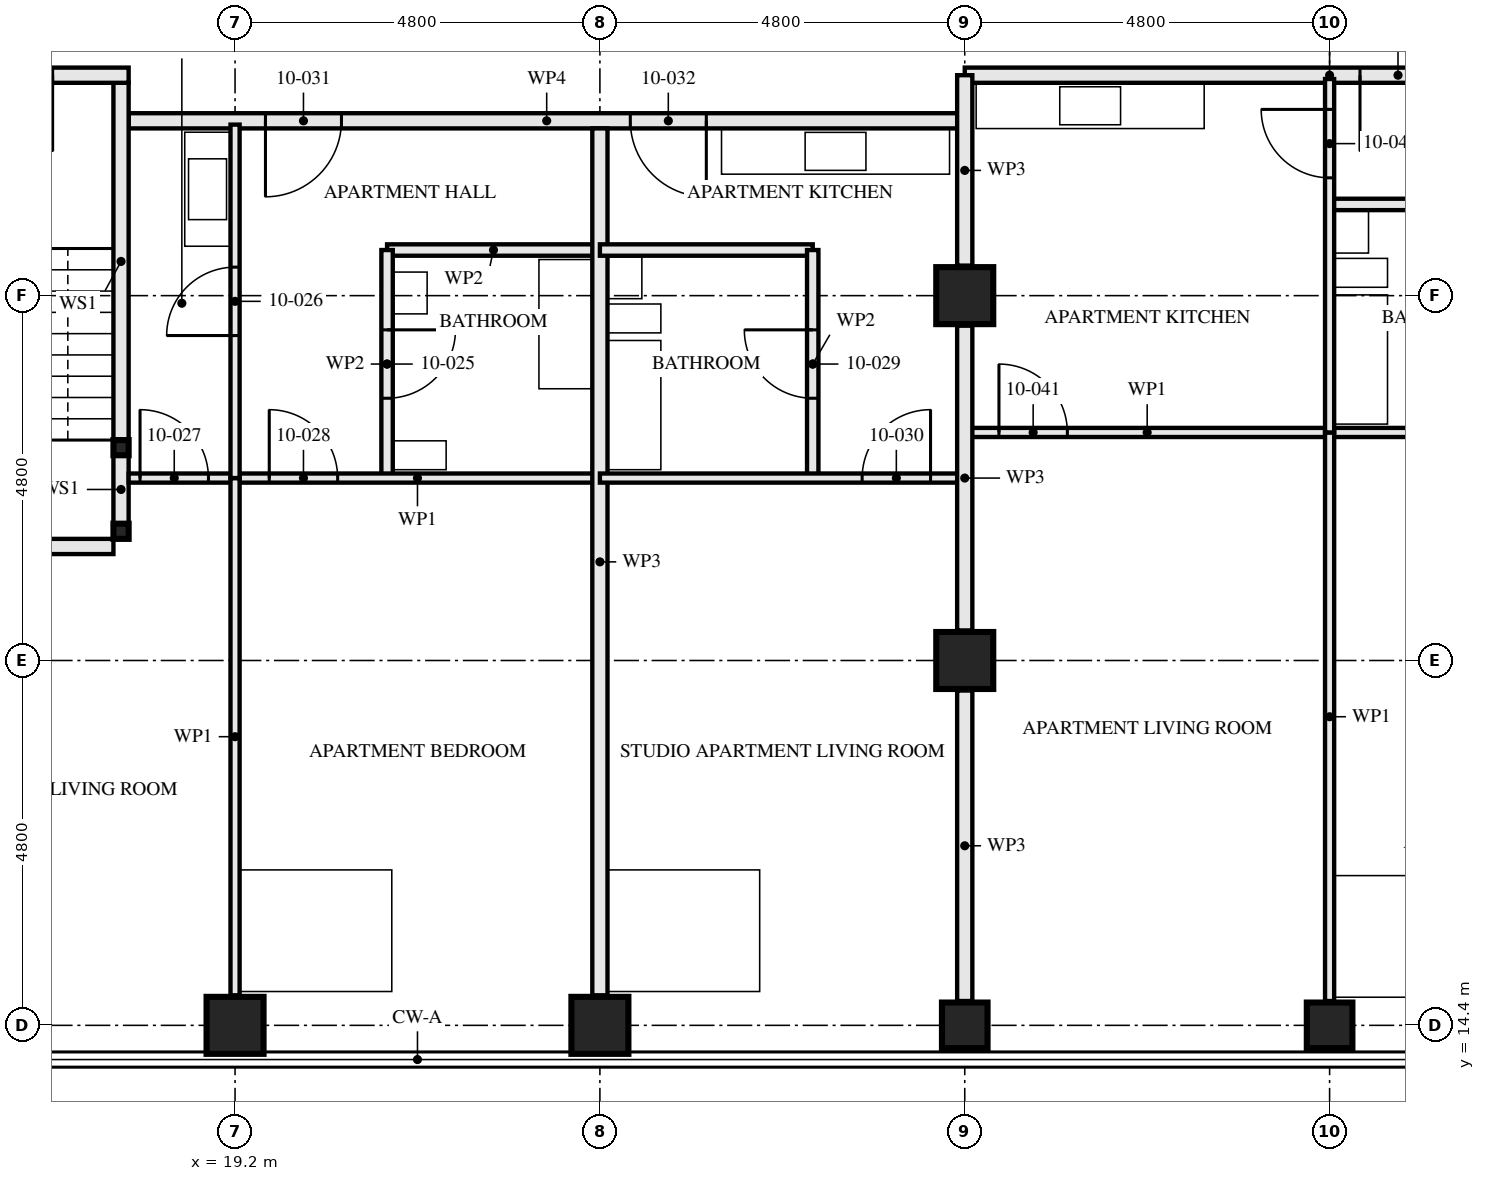
"""IFC4 building model, lengths in metres.
Left out: names, types, materials, properties, quantities, classifications, styles, units other than length and angle.
Written with IfcOpenShell. Run it as: python <this file> out.ifc"""

import sys

from ifc_helpers import new_model, si_unit, direction, frame, frame_2d, origin, origin_2d, place, context, subcontext, project, spatial, rectangle, hollow_rectangle, extrude, element, fill, save


model = new_model("IFC4")
c1 = context("Model", 3, precision=1e-05, world=origin(), true_north=direction((0.0, 1.0)))
c2 = subcontext(c1, "Body", "Model", "MODEL_VIEW")
j1 = project(units=[si_unit("LENGTHUNIT", "METRE"), si_unit("PLANEANGLEUNIT", "RADIAN")], contexts=[c1])
p1 = place(None, origin())
s1 = spatial("IfcSite", under=j1, at=p1, CompositionType="ELEMENT")
p2 = place(p1, origin())
s2 = spatial("IfcBuilding", under=s1, at=p2, CompositionType="ELEMENT")
p3 = place(p2, frame((0.0, 0.0, 41.0)))
s3 = spatial("IfcBuildingStorey", under=s2, at=p3, CompositionType="ELEMENT", Elevation=41.0)
for number, where, z_axis, x_axis in (
    (1, (19.2, 14.4, 0.0), (0.0, 0.0, 1.0), (0.0, 1.0, 0.0)),
    (2, (24.0, 14.4, 0.0), (0.0, 0.0, 1.0), (0.0, 1.0, 0.0)),
):
    element("IfcColumn", number, at=place(p3, frame(where, z_axis=z_axis, x_axis=x_axis)), inside=s3, PredefinedType="COLUMN", context=c2, shape_type="SweptSolid", body=[
        extrude(hollow_rectangle(XDim=0.75, YDim=0.75, WallThickness=0.08, at=origin_2d()), origin(), (0.0, 0.0, 1.0), 3.5),
    ])
p4 = place(p3, frame((28.8, 14.4, 0.0), z_axis=(0.0, 0.0, 1.0), x_axis=(0.0, 1.0, 0.0)))
e3 = element("IfcColumn", 3, at=p4, inside=s3, PredefinedType="COLUMN", context=c2, shape_type="SweptSolid", body=[
    extrude(hollow_rectangle(XDim=0.6, YDim=0.6, WallThickness=0.08, at=origin_2d()), origin(), (0.0, 0.0, 1.0), 3.5),
])
for number, where, z_axis, x_axis in (
    (4, (28.8, 19.2, 0.0), (0.0, 0.0, 1.0), (1.0, 0.0, 0.0)),
    (5, (28.8, 24.0, 0.0), (0.0, 0.0, 1.0), (1.0, 0.0, 0.0)),
):
    element("IfcColumn", number, at=place(p3, frame(where, z_axis=z_axis, x_axis=x_axis)), inside=s3, PredefinedType="COLUMN", context=c2, shape_type="SweptSolid", body=[
        extrude(hollow_rectangle(XDim=0.75, YDim=0.75, WallThickness=0.08, at=origin_2d()), origin(), (0.0, 0.0, 1.0), 3.5),
    ])
p5 = place(p3, frame((33.6, 14.4, 0.0), z_axis=(0.0, 0.0, 1.0), x_axis=(0.0, 1.0, 0.0)))
e6 = element("IfcColumn", 6, at=p5, inside=s3, PredefinedType="COLUMN", context=c2, shape_type="SweptSolid", body=[
    extrude(hollow_rectangle(XDim=0.6, YDim=0.6, WallThickness=0.08, at=origin_2d()), origin(), (0.0, 0.0, 1.0), 3.5),
])
for number, where, z_axis, x_axis in (
    (7, (17.7, 20.9, 0.0), (0.0, 0.0, 1.0), (1.0, 0.0, 0.0)),
    (8, (17.7, 22.0, 0.0), (0.0, 0.0, 1.0), (1.0, 0.0, 0.0)),
):
    element("IfcColumn", number, at=place(p3, frame(where, z_axis=z_axis, x_axis=x_axis)), inside=s3, PredefinedType="COLUMN", context=c2, shape_type="SweptSolid", body=[
        extrude(hollow_rectangle(XDim=0.2, YDim=0.2, WallThickness=0.008, at=origin_2d()), origin(), (0.0, 0.0, 1.0), 3.33),
    ])
p6 = place(p3, frame((17.7, 21.0, 0.0), z_axis=(0.0, 0.0, 1.0), x_axis=(0.0, 1.0, 0.0)))
e9 = element("IfcWall", 9, at=p6, inside=s3, PredefinedType="SOLIDWALL", context=c2, shape_type="SweptSolid", body=[
    extrude(rectangle(XDim=0.9, YDim=0.2, at=frame_2d((0.45, 0.0))), origin(), (0.0, 0.0, 1.0), 2.99),
])
p7 = place(p3, frame((17.7, 22.1, 0.0), z_axis=(0.0, 0.0, 1.0), x_axis=(0.0, 1.0, 0.0)))
e10 = element("IfcWall", 10, at=p7, inside=s3, PredefinedType="SOLIDWALL", context=c2, shape_type="SweptSolid", body=[
    extrude(rectangle(XDim=4.7, YDim=0.2, at=frame_2d((2.35, 0.0))), origin(), (0.0, 0.0, 1.0), 2.99),
])
p8 = place(p3, frame((15.0, 20.7, 0.0), z_axis=(0.0, 0.0, 1.0), x_axis=(1.0, 0.0, 0.0)))
e11 = element("IfcWall", 11, at=p8, inside=s3, PredefinedType="SOLIDWALL", context=c2, shape_type="SweptSolid", body=[
    extrude(rectangle(XDim=2.6, YDim=0.2, at=frame_2d((1.3, 0.0))), origin(), (0.0, 0.0, 1.0), 3.33),
])
p9 = place(p3, frame((14.4, 26.9, 0.0), z_axis=(0.0, 0.0, 1.0), x_axis=(1.0, 0.0, 0.0)))
e12 = element("IfcWall", 12, at=p9, inside=s3, PredefinedType="SOLIDWALL", context=c2, shape_type="SweptSolid", body=[
    extrude(rectangle(XDim=3.4, YDim=0.2, at=frame_2d((1.7, 0.0))), origin(), (0.0, 0.0, 1.0), 3.33),
])
p10 = place(p9, frame((1.4, 0.0, 0.0)))
e13 = element("IfcOpeningElement", 13, at=p10, cuts=e12, PredefinedType="OPENING", context=c2, shape_type="SweptSolid", body=[
    extrude(rectangle(XDim=1.0, YDim=2.1, at=frame_2d((0.5, 1.05))), frame((0.0, 0.111, 0.0), z_axis=(0.0, -1.0, 0.0), x_axis=(1.0, 0.0, 0.0)), (0.0, 0.0, 1.0), 0.221),
])
p11 = place(p3, frame((21.2, 21.6, 0.0), z_axis=(0.0, 0.0, 1.0), x_axis=(0.0, 1.0, 0.0)))
e14 = element("IfcWall", 14, at=p11, inside=s3, PredefinedType="PARTITIONING", context=c2, shape_type="SweptSolid", body=[
    extrude(rectangle(XDim=3.0, YDim=0.15, at=frame_2d((1.5, 0.0))), origin(), (0.0, 0.0, 1.0), 2.55),
])
p12 = place(p11, frame((1.05, 0.0, 0.0)))
e15 = element("IfcOpeningElement", 15, at=p12, cuts=e14, PredefinedType="OPENING", context=c2, shape_type="SweptSolid", body=[
    extrude(rectangle(XDim=0.9, YDim=2.1, at=frame_2d((0.45, 1.05))), frame((0.0, 0.085, 0.0), z_axis=(0.0, -1.0, 0.0), x_axis=(1.0, 0.0, 0.0)), (0.0, 0.0, 1.0), 0.171),
])
p13 = place(p3, frame((21.2, 24.6, 0.0), z_axis=(0.0, 0.0, 1.0), x_axis=(1.0, 0.0, 0.0)))
e16 = element("IfcWall", 16, at=p13, inside=s3, PredefinedType="PARTITIONING", context=c2, shape_type="SweptSolid", body=[
    extrude(rectangle(XDim=2.8, YDim=0.15, at=frame_2d((1.4, 0.0))), origin(), (0.0, 0.0, 1.0), 3.33),
])
p14 = place(p3, frame((19.2, 21.6, 0.0), z_axis=(0.0, 0.0, 1.0), x_axis=(0.0, 1.0, 0.0)))
e17 = element("IfcWall", 17, at=p14, inside=s3, PredefinedType="PARTITIONING", context=c2, shape_type="SweptSolid", body=[
    extrude(rectangle(XDim=4.65, YDim=0.12, at=frame_2d((2.325, 0.0))), origin(), (0.0, 0.0, 1.0), 2.55),
])
p15 = place(p14, frame((1.875, 0.0, 0.0)))
e18 = element("IfcOpeningElement", 18, at=p15, cuts=e17, PredefinedType="OPENING", context=c2, shape_type="SweptSolid", body=[
    extrude(rectangle(XDim=0.9, YDim=2.1, at=frame_2d((0.45, 1.05))), frame((0.0, 0.071, 0.0), z_axis=(0.0, -1.0, 0.0), x_axis=(1.0, 0.0, 0.0)), (0.0, 0.0, 1.0), 0.141),
])
p16 = place(p3, frame((17.8, 21.6, 0.0), z_axis=(0.0, 0.0, 1.0), x_axis=(1.0, 0.0, 0.0)))
e19 = element("IfcWall", 19, at=p16, inside=s3, PredefinedType="PARTITIONING", context=c2, shape_type="SweptSolid", body=[
    extrude(rectangle(XDim=1.4, YDim=0.12, at=frame_2d((0.7, 0.0))), origin(), (0.0, 0.0, 1.0), 3.33),
])
p17 = place(p16, frame((0.15, 0.0, 0.0)))
e20 = element("IfcOpeningElement", 20, at=p17, cuts=e19, PredefinedType="OPENING", context=c2, shape_type="SweptSolid", body=[
    extrude(rectangle(XDim=0.9, YDim=2.1, at=frame_2d((0.45, 1.05))), frame((0.0, 0.071, 0.0), z_axis=(0.0, -1.0, 0.0), x_axis=(1.0, 0.0, 0.0)), (0.0, 0.0, 1.0), 0.141),
])
p18 = place(p3, frame((19.2, 21.6, 0.0), z_axis=(0.0, 0.0, 1.0), x_axis=(1.0, 0.0, 0.0)))
e21 = element("IfcWall", 21, at=p18, inside=s3, PredefinedType="PARTITIONING", context=c2, shape_type="SweptSolid", body=[
    extrude(rectangle(XDim=4.8, YDim=0.12, at=frame_2d((2.4, 0.0))), origin(), (0.0, 0.0, 1.0), 3.33),
])
p19 = place(p18, frame((0.45, 0.0, 0.0)))
e22 = element("IfcOpeningElement", 22, at=p19, cuts=e21, PredefinedType="OPENING", context=c2, shape_type="SweptSolid", body=[
    extrude(rectangle(XDim=0.9, YDim=2.1, at=frame_2d((0.45, 1.05))), frame((0.0, 0.071, 0.0), z_axis=(0.0, -1.0, 0.0), x_axis=(1.0, 0.0, 0.0)), (0.0, 0.0, 1.0), 0.141),
])
p20 = place(p3, frame((19.2, 14.795, 0.0), z_axis=(0.0, 0.0, 1.0), x_axis=(0.0, 1.0, 0.0)))
e23 = element("IfcWall", 23, at=p20, inside=s3, PredefinedType="PARTITIONING", context=c2, shape_type="SweptSolid", body=[
    extrude(rectangle(XDim=6.805, YDim=0.12, at=frame_2d((3.403, 0.0))), origin(), (0.0, 0.0, 1.0), 2.55),
])
p21 = place(p3, frame((24.0, 14.795, 0.0), z_axis=(0.0, 0.0, 1.0), x_axis=(0.0, 1.0, 0.0)))
e24 = element("IfcWall", 24, at=p21, inside=s3, PredefinedType="PARTITIONING", context=c2, shape_type="SweptSolid", body=[
    extrude(rectangle(XDim=11.405, YDim=0.2, at=frame_2d((5.703, 0.0))), origin(), (0.0, 0.0, 1.0), 2.55),
])
p22 = place(p3, frame((26.8, 21.6, 0.0), z_axis=(0.0, 0.0, 1.0), x_axis=(0.0, 1.0, 0.0)))
e25 = element("IfcWall", 25, at=p22, inside=s3, PredefinedType="PARTITIONING", context=c2, shape_type="SweptSolid", body=[
    extrude(rectangle(XDim=3.0, YDim=0.15, at=frame_2d((1.5, 0.0))), origin(), (0.0, 0.0, 1.0), 2.55),
])
p23 = place(p22, frame((1.05, 0.0, 0.0)))
e26 = element("IfcOpeningElement", 26, at=p23, cuts=e25, PredefinedType="OPENING", context=c2, shape_type="SweptSolid", body=[
    extrude(rectangle(XDim=0.9, YDim=2.1, at=frame_2d((0.45, 1.05))), frame((0.0, 0.085, 0.0), z_axis=(0.0, -1.0, 0.0), x_axis=(1.0, 0.0, 0.0)), (0.0, 0.0, 1.0), 0.171),
])
p24 = place(p3, frame((24.0, 24.6, 0.0), z_axis=(0.0, 0.0, 1.0), x_axis=(1.0, 0.0, 0.0)))
e27 = element("IfcWall", 27, at=p24, inside=s3, PredefinedType="PARTITIONING", context=c2, shape_type="SweptSolid", body=[
    extrude(rectangle(XDim=2.8, YDim=0.15, at=frame_2d((1.4, 0.0))), origin(), (0.0, 0.0, 1.0), 3.33),
])
p25 = place(p3, frame((24.0, 21.6, 0.0), z_axis=(0.0, 0.0, 1.0), x_axis=(1.0, 0.0, 0.0)))
e28 = element("IfcWall", 28, at=p25, inside=s3, PredefinedType="PARTITIONING", context=c2, shape_type="SweptSolid", body=[
    extrude(rectangle(XDim=4.8, YDim=0.12, at=frame_2d((2.4, 0.0))), origin(), (0.0, 0.0, 1.0), 3.33),
])
p26 = place(p25, frame((3.45, 0.0, 0.0)))
e29 = element("IfcOpeningElement", 29, at=p26, cuts=e28, PredefinedType="OPENING", context=c2, shape_type="SweptSolid", body=[
    extrude(rectangle(XDim=0.9, YDim=2.1, at=frame_2d((0.45, 1.05))), frame((0.0, 0.071, 0.0), z_axis=(0.0, -1.0, 0.0), x_axis=(1.0, 0.0, 0.0)), (0.0, 0.0, 1.0), 0.141),
])
p27 = place(p3, frame((17.8, 26.3, 0.0), z_axis=(0.0, 0.0, 1.0), x_axis=(1.0, 0.0, 0.0)))
e30 = element("IfcWall", 30, at=p27, inside=s3, PredefinedType="PARTITIONING", context=c2, shape_type="SweptSolid", body=[
    extrude(rectangle(XDim=11.0, YDim=0.2, at=frame_2d((5.5, 0.0))), origin(), (0.0, 0.0, 1.0), 2.55),
])
p28 = place(p27, frame((1.8, 0.0, 0.0)))
e31 = element("IfcOpeningElement", 31, at=p28, cuts=e30, PredefinedType="OPENING", context=c2, shape_type="SweptSolid", body=[
    extrude(rectangle(XDim=1.0, YDim=2.1, at=frame_2d((0.5, 1.05))), frame((0.0, 0.111, 0.0), z_axis=(0.0, -1.0, 0.0), x_axis=(1.0, 0.0, 0.0)), (0.0, 0.0, 1.0), 0.221),
])
p29 = place(p27, frame((6.6, 0.0, 0.0)))
e32 = element("IfcOpeningElement", 32, at=p29, cuts=e30, PredefinedType="OPENING", context=c2, shape_type="SweptSolid", body=[
    extrude(rectangle(XDim=1.0, YDim=2.1, at=frame_2d((0.5, 1.05))), frame((0.0, 0.111, 0.0), z_axis=(0.0, -1.0, 0.0), x_axis=(1.0, 0.0, 0.0)), (0.0, 0.0, 1.0), 0.221),
])
p30 = place(p3, frame((33.6, 25.2, 0.0), z_axis=(0.0, 0.0, 1.0), x_axis=(1.0, 0.0, 0.0)))
e33 = element("IfcWall", 33, at=p30, inside=s3, PredefinedType="PARTITIONING", context=c2, shape_type="SweptSolid", body=[
    extrude(rectangle(XDim=2.8, YDim=0.15, at=frame_2d((1.4, 0.0))), origin(), (0.0, 0.0, 1.0), 3.33),
])
p31 = place(p3, frame((33.6, 22.2, 0.0), z_axis=(0.0, 0.0, 1.0), x_axis=(0.0, 1.0, 0.0)))
e34 = element("IfcWall", 34, at=p31, inside=s3, PredefinedType="PARTITIONING", context=c2, shape_type="SweptSolid", body=[
    extrude(rectangle(XDim=4.65, YDim=0.12, at=frame_2d((2.325, 0.0))), origin(), (0.0, 0.0, 1.0), 2.55),
])
p32 = place(p31, frame((3.35, 0.0, 0.0)))
e35 = element("IfcOpeningElement", 35, at=p32, cuts=e34, PredefinedType="OPENING", context=c2, shape_type="SweptSolid", body=[
    extrude(rectangle(XDim=0.9, YDim=2.1, at=frame_2d((0.45, 1.05))), frame((0.0, 0.071, 0.0), z_axis=(0.0, -1.0, 0.0), x_axis=(1.0, 0.0, 0.0)), (0.0, 0.0, 1.0), 0.141),
])
p33 = place(p3, frame((28.8, 22.2, 0.0), z_axis=(0.0, 0.0, 1.0), x_axis=(1.0, 0.0, 0.0)))
e36 = element("IfcWall", 36, at=p33, inside=s3, PredefinedType="PARTITIONING", context=c2, shape_type="SweptSolid", body=[
    extrude(rectangle(XDim=4.8, YDim=0.12, at=frame_2d((2.4, 0.0))), origin(), (0.0, 0.0, 1.0), 3.33),
])
p34 = place(p33, frame((0.45, 0.0, 0.0)))
e37 = element("IfcOpeningElement", 37, at=p34, cuts=e36, PredefinedType="OPENING", context=c2, shape_type="SweptSolid", body=[
    extrude(rectangle(XDim=0.9, YDim=2.1, at=frame_2d((0.45, 1.05))), frame((0.0, 0.071, 0.0), z_axis=(0.0, -1.0, 0.0), x_axis=(1.0, 0.0, 0.0)), (0.0, 0.0, 1.0), 0.141),
])
p35 = place(p3, frame((33.6, 22.2, 0.0), z_axis=(0.0, 0.0, 1.0), x_axis=(1.0, 0.0, 0.0)))
e38 = element("IfcWall", 38, at=p35, inside=s3, PredefinedType="PARTITIONING", context=c2, shape_type="SweptSolid", body=[
    extrude(rectangle(XDim=4.8, YDim=0.12, at=frame_2d((2.4, 0.0))), origin(), (0.0, 0.0, 1.0), 3.33),
])
p36 = place(p35, frame((3.45, 0.0, 0.0)))
e39 = element("IfcOpeningElement", 39, at=p36, cuts=e38, PredefinedType="OPENING", context=c2, shape_type="SweptSolid", body=[
    extrude(rectangle(XDim=0.9, YDim=2.1, at=frame_2d((0.45, 1.05))), frame((0.0, 0.071, 0.0), z_axis=(0.0, -1.0, 0.0), x_axis=(1.0, 0.0, 0.0)), (0.0, 0.0, 1.0), 0.141),
])
p37 = place(p3, frame((33.6, 14.72, 0.0), z_axis=(0.0, 0.0, 1.0), x_axis=(0.0, 1.0, 0.0)))
e40 = element("IfcWall", 40, at=p37, inside=s3, PredefinedType="PARTITIONING", context=c2, shape_type="SweptSolid", body=[
    extrude(rectangle(XDim=7.48, YDim=0.12, at=frame_2d((3.74, 0.0))), origin(), (0.0, 0.0, 1.0), 2.55),
])
p38 = place(p3, frame((28.8, 26.9, 0.0), z_axis=(0.0, 0.0, 1.0), x_axis=(1.0, 0.0, 0.0)))
e41 = element("IfcWall", 41, at=p38, inside=s3, PredefinedType="PARTITIONING", context=c2, shape_type="SweptSolid", body=[
    extrude(rectangle(XDim=9.6, YDim=0.2, at=frame_2d((4.8, 0.0))), origin(), (0.0, 0.0, 1.0), 3.33),
])
p39 = place(p38, frame((5.2, 0.0, 0.0)))
e42 = element("IfcOpeningElement", 42, at=p39, cuts=e41, PredefinedType="OPENING", context=c2, shape_type="SweptSolid", body=[
    extrude(rectangle(XDim=1.0, YDim=2.1, at=frame_2d((0.5, 1.05))), frame((0.0, 0.111, 0.0), z_axis=(0.0, -1.0, 0.0), x_axis=(1.0, 0.0, 0.0)), (0.0, 0.0, 1.0), 0.221),
])
p40 = place(p3, frame((28.8, 14.72, 0.0), z_axis=(0.0, 0.0, 1.0), x_axis=(0.0, 1.0, 0.0)))
e43 = element("IfcWall", 43, at=p40, inside=s3, PredefinedType="PARTITIONING", context=c2, shape_type="SweptSolid", body=[
    extrude(rectangle(XDim=4.085, YDim=0.2, at=frame_2d((2.042, 0.0))), origin(), (0.0, 0.0, 1.0), 2.32),
])
p41 = place(p3, frame((28.8, 19.595, 0.0), z_axis=(0.0, 0.0, 1.0), x_axis=(0.0, 1.0, 0.0)))
e44 = element("IfcWall", 44, at=p41, inside=s3, PredefinedType="PARTITIONING", context=c2, shape_type="SweptSolid", body=[
    extrude(rectangle(XDim=4.01, YDim=0.2, at=frame_2d((2.005, 0.0))), origin(), (0.0, 0.0, 1.0), 2.32),
])
p42 = place(p3, frame((28.8, 24.395, 0.0), z_axis=(0.0, 0.0, 1.0), x_axis=(0.0, 1.0, 0.0)))
e45 = element("IfcWall", 45, at=p42, inside=s3, PredefinedType="PARTITIONING", context=c2, shape_type="SweptSolid", body=[
    extrude(rectangle(XDim=2.505, YDim=0.2, at=frame_2d((1.252, 0.0))), origin(), (0.0, 0.0, 1.0), 2.32),
])
p43 = place(p12, frame((0.9, 0.0, 0.0), z_axis=(0.0, 0.0, 1.0), x_axis=(-1.0, 0.0, 0.0)))
e46 = element("IfcDoor", 46, at=p43, inside=s3, OperationType="SINGLE_SWING_RIGHT", PredefinedType="DOOR", context=c2, shape_type="SweptSolid", body=[
    extrude(rectangle(XDim=0.9, YDim=2.1, at=frame_2d((0.45, 1.05))), frame((0.0, 0.022, 0.0), z_axis=(0.0, -1.0, 0.0), x_axis=(1.0, 0.0, 0.0)), (0.0, 0.0, 1.0), 0.044),
])
fill(e15, e46)
p44 = place(p15, origin())
e47 = element("IfcDoor", 47, at=p44, inside=s3, OperationType="SINGLE_SWING_RIGHT", PredefinedType="DOOR", context=c2, shape_type="SweptSolid", body=[
    extrude(rectangle(XDim=0.9, YDim=2.1, at=frame_2d((0.45, 1.05))), frame((0.0, 0.022, 0.0), z_axis=(0.0, -1.0, 0.0), x_axis=(1.0, 0.0, 0.0)), (0.0, 0.0, 1.0), 0.044),
])
fill(e18, e47)
p45 = place(p17, origin())
e48 = element("IfcDoor", 48, at=p45, inside=s3, OperationType="SINGLE_SWING_RIGHT", PredefinedType="DOOR", context=c2, shape_type="SweptSolid", body=[
    extrude(rectangle(XDim=0.9, YDim=2.1, at=frame_2d((0.45, 1.05))), frame((0.0, 0.022, 0.0), z_axis=(0.0, -1.0, 0.0), x_axis=(1.0, 0.0, 0.0)), (0.0, 0.0, 1.0), 0.044),
])
fill(e20, e48)
p46 = place(p19, origin())
e49 = element("IfcDoor", 49, at=p46, inside=s3, OperationType="SINGLE_SWING_RIGHT", PredefinedType="DOOR", context=c2, shape_type="SweptSolid", body=[
    extrude(rectangle(XDim=0.9, YDim=2.1, at=frame_2d((0.45, 1.05))), frame((0.0, 0.022, 0.0), z_axis=(0.0, -1.0, 0.0), x_axis=(1.0, 0.0, 0.0)), (0.0, 0.0, 1.0), 0.044),
])
fill(e22, e49)
p47 = place(p23, origin())
e50 = element("IfcDoor", 50, at=p47, inside=s3, OperationType="SINGLE_SWING_LEFT", PredefinedType="DOOR", context=c2, shape_type="SweptSolid", body=[
    extrude(rectangle(XDim=0.9, YDim=2.1, at=frame_2d((0.45, 1.05))), frame((0.0, 0.022, 0.0), z_axis=(0.0, -1.0, 0.0), x_axis=(1.0, 0.0, 0.0)), (0.0, 0.0, 1.0), 0.044),
])
fill(e26, e50)
p48 = place(p26, origin())
e51 = element("IfcDoor", 51, at=p48, inside=s3, OperationType="SINGLE_SWING_LEFT", PredefinedType="DOOR", context=c2, shape_type="SweptSolid", body=[
    extrude(rectangle(XDim=0.9, YDim=2.1, at=frame_2d((0.45, 1.05))), frame((0.0, 0.022, 0.0), z_axis=(0.0, -1.0, 0.0), x_axis=(1.0, 0.0, 0.0)), (0.0, 0.0, 1.0), 0.044),
])
fill(e29, e51)
p49 = place(p28, frame((1.0, 0.0, 0.0), z_axis=(0.0, 0.0, 1.0), x_axis=(-1.0, 0.0, 0.0)))
e52 = element("IfcDoor", 52, at=p49, inside=s3, OperationType="SINGLE_SWING_LEFT", PredefinedType="DOOR", context=c2, shape_type="SweptSolid", body=[
    extrude(rectangle(XDim=1.0, YDim=2.1, at=frame_2d((0.5, 1.05))), frame((0.0, 0.027, 0.0), z_axis=(0.0, -1.0, 0.0), x_axis=(1.0, 0.0, 0.0)), (0.0, 0.0, 1.0), 0.054),
])
fill(e31, e52)
p50 = place(p29, frame((1.0, 0.0, 0.0), z_axis=(0.0, 0.0, 1.0), x_axis=(-1.0, 0.0, 0.0)))
e53 = element("IfcDoor", 53, at=p50, inside=s3, OperationType="SINGLE_SWING_RIGHT", PredefinedType="DOOR", context=c2, shape_type="SweptSolid", body=[
    extrude(rectangle(XDim=1.0, YDim=2.1, at=frame_2d((0.5, 1.05))), frame((0.0, 0.027, 0.0), z_axis=(0.0, -1.0, 0.0), x_axis=(1.0, 0.0, 0.0)), (0.0, 0.0, 1.0), 0.054),
])
fill(e32, e53)
p51 = place(p32, origin())
e54 = element("IfcDoor", 54, at=p51, inside=s3, OperationType="SINGLE_SWING_LEFT", PredefinedType="DOOR", context=c2, shape_type="SweptSolid", body=[
    extrude(rectangle(XDim=0.9, YDim=2.1, at=frame_2d((0.45, 1.05))), frame((0.0, 0.022, 0.0), z_axis=(0.0, -1.0, 0.0), x_axis=(1.0, 0.0, 0.0)), (0.0, 0.0, 1.0), 0.044),
])
fill(e35, e54)
p52 = place(p34, origin())
e55 = element("IfcDoor", 55, at=p52, inside=s3, OperationType="SINGLE_SWING_RIGHT", PredefinedType="DOOR", context=c2, shape_type="SweptSolid", body=[
    extrude(rectangle(XDim=0.9, YDim=2.1, at=frame_2d((0.45, 1.05))), frame((0.0, 0.022, 0.0), z_axis=(0.0, -1.0, 0.0), x_axis=(1.0, 0.0, 0.0)), (0.0, 0.0, 1.0), 0.044),
])
fill(e37, e55)
p53 = place(p39, frame((1.0, 0.0, 0.0), z_axis=(0.0, 0.0, 1.0), x_axis=(-1.0, 0.0, 0.0)))
e56 = element("IfcDoor", 56, at=p53, inside=s3, OperationType="SINGLE_SWING_LEFT", PredefinedType="DOOR", context=c2, shape_type="SweptSolid", body=[
    extrude(rectangle(XDim=1.0, YDim=2.1, at=frame_2d((0.5, 1.05))), frame((0.0, 0.027, 0.0), z_axis=(0.0, -1.0, 0.0), x_axis=(1.0, 0.0, 0.0)), (0.0, 0.0, 1.0), 0.054),
])
fill(e42, e56)
save(model, sys.argv[1])
